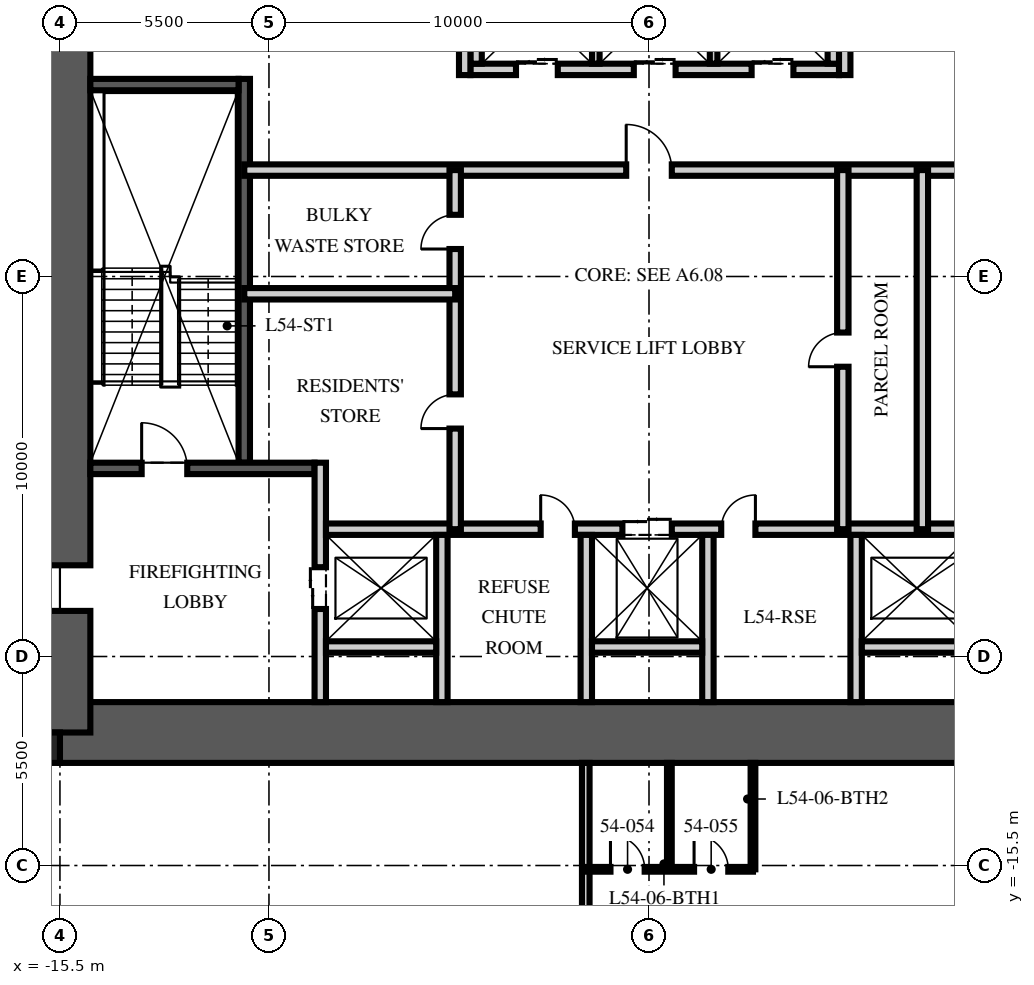
"""IFC4 building model, lengths in metres.
Left out: names, types, materials, properties, quantities, classifications, styles, units other than length and angle.
Written with IfcOpenShell. Run it as: python <this file> out.ifc"""

import sys

from ifc_helpers import new_model, si_unit, direction, frame, frame_2d, origin, origin_2d, place, context, subcontext, project, spatial, rectangle, extrude, element, fill, save


model = new_model("IFC4")
c1 = context("Model", 3, precision=1e-05, world=origin(), true_north=direction((0.0, 1.0)))
c2 = subcontext(c1, "Body", "Model", "MODEL_VIEW")
j1 = project(units=[si_unit("LENGTHUNIT", "METRE"), si_unit("PLANEANGLEUNIT", "RADIAN")], contexts=[c1])
p1 = place(None, origin())
s1 = spatial("IfcSite", under=j1, at=p1, CompositionType="ELEMENT")
p2 = place(p1, origin())
s2 = spatial("IfcBuilding", under=s1, at=p2, CompositionType="ELEMENT")
p3 = place(p2, frame((0.0, 0.0, 218.25)))
s3 = spatial("IfcBuildingStorey", under=s2, at=p3, CompositionType="ELEMENT", Elevation=218.25)
p4 = place(p3, frame((-15.5, -12.0, -0.25), z_axis=(0.0, 0.0, 1.0), x_axis=(1.0, 0.0, 0.0)))
e1 = element("IfcWall", 1, at=p4, inside=s3, PredefinedType="SHEAR", context=c2, shape_type="SweptSolid", body=[
    extrude(rectangle(XDim=31.0, YDim=1.6, at=frame_2d((15.5, 0.0))), origin(), (0.0, 0.0, 1.0), 3.75),
])
p5 = place(p3, frame((-15.5, -12.0, -0.25), z_axis=(0.0, 0.0, 1.0), x_axis=(0.0, 1.0, 0.0)))
e2 = element("IfcWall", 2, at=p5, inside=s3, PredefinedType="SHEAR", context=c2, shape_type="SweptSolid", body=[
    extrude(rectangle(XDim=24.0, YDim=1.6, at=frame_2d((12.0, 0.0))), origin(), (0.0, 0.0, 1.0), 3.75),
])
p6 = place(p5, frame((3.2, 0.0, 0.25)))
e3 = element("IfcOpeningElement", 3, at=p6, cuts=e2, PredefinedType="OPENING", context=c2, shape_type="SweptSolid", body=[
    extrude(rectangle(XDim=1.2, YDim=2.1, at=frame_2d((0.6, 1.05))), frame((0.0, 0.81, 0.0), z_axis=(0.0, -1.0, 0.0), x_axis=(1.0, 0.0, 0.0)), (0.0, 0.0, 1.0), 1.62),
])
p7 = place(p5, frame((19.3, 0.0, 0.25)))
e4 = element("IfcOpeningElement", 4, at=p7, cuts=e2, PredefinedType="OPENING", context=c2, shape_type="SweptSolid", body=[
    extrude(rectangle(XDim=1.8, YDim=2.1, at=frame_2d((0.9, 1.05))), frame((0.0, 0.81, 0.0), z_axis=(0.0, -1.0, 0.0), x_axis=(1.0, 0.0, 0.0)), (0.0, 0.0, 1.0), 1.62),
])
p8 = place(p3, frame((-15.9, -12.4, -0.25), z_axis=(0.0, 0.0, 1.0), x_axis=(1.0, 0.0, 0.0)))
e5 = element("IfcColumn", 5, at=p8, inside=s3, PredefinedType="COLUMN", context=c2, shape_type="SweptSolid", body=[
    extrude(rectangle(XDim=0.8, YDim=0.8, at=origin_2d()), origin(), (0.0, 0.0, 1.0), 3.75),
])
p9 = place(p3, frame((-10.65, -4.9, 0.0), z_axis=(0.0, 0.0, 1.0), x_axis=(0.0, 1.0, 0.0)))
e6 = element("IfcWall", 6, at=p9, inside=s3, PredefinedType="SOLIDWALL", context=c2, shape_type="SweptSolid", body=[
    extrude(rectangle(XDim=10.1, YDim=0.3, at=frame_2d((5.05, 0.0))), origin(), (0.0, 0.0, 1.0), 3.5),
])
p10 = place(p3, frame((-14.7, -5.05, 0.0), z_axis=(0.0, 0.0, 1.0), x_axis=(1.0, 0.0, 0.0)))
e7 = element("IfcWall", 7, at=p10, inside=s3, PredefinedType="SOLIDWALL", context=c2, shape_type="SweptSolid", body=[
    extrude(rectangle(XDim=5.9, YDim=0.3, at=frame_2d((2.95, 0.0))), origin(), (0.0, 0.0, 1.0), 3.5),
])
p11 = place(p10, frame((1.35, 0.0, 0.0)))
e8 = element("IfcOpeningElement", 8, at=p11, cuts=e7, PredefinedType="OPENING", context=c2, shape_type="SweptSolid", body=[
    extrude(rectangle(XDim=1.2, YDim=2.1, at=frame_2d((0.6, 1.05))), frame((0.0, 0.16, 0.0), z_axis=(0.0, -1.0, 0.0), x_axis=(1.0, 0.0, 0.0)), (0.0, 0.0, 1.0), 0.32),
])
p12 = place(p3, frame((-14.7, 5.05, 0.0), z_axis=(0.0, 0.0, 1.0), x_axis=(1.0, 0.0, 0.0)))
e9 = element("IfcWall", 9, at=p12, inside=s3, PredefinedType="SOLIDWALL", context=c2, shape_type="SweptSolid", body=[
    extrude(rectangle(XDim=3.9, YDim=0.3, at=frame_2d((1.95, 0.0))), origin(), (0.0, 0.0, 1.0), 3.5),
])
p13 = place(p3, frame((-8.65, -11.2, 0.0), z_axis=(0.0, 0.0, 1.0), x_axis=(0.0, 1.0, 0.0)))
e10 = element("IfcWall", 10, at=p13, inside=s3, PredefinedType="PARTITIONING", context=c2, shape_type="SweptSolid", body=[
    extrude(rectangle(XDim=6.3, YDim=0.3, at=frame_2d((3.15, 0.0))), origin(), (0.0, 0.0, 1.0), 3.5),
])
p14 = place(p13, frame((2.45, 0.0, 0.0)))
e11 = element("IfcOpeningElement", 11, at=p14, cuts=e10, PredefinedType="OPENING", context=c2, shape_type="SweptSolid", body=[
    extrude(rectangle(XDim=1.1, YDim=2.1, at=frame_2d((0.55, 1.05))), frame((0.0, 0.16, 0.0), z_axis=(0.0, -1.0, 0.0), x_axis=(1.0, 0.0, 0.0)), (0.0, 0.0, 1.0), 0.32),
])
p15 = place(p3, frame((-8.5, -6.65, 0.0), z_axis=(0.0, 0.0, 1.0), x_axis=(1.0, 0.0, 0.0)))
e12 = element("IfcWall", 12, at=p15, inside=s3, PredefinedType="PARTITIONING", context=c2, shape_type="SweptSolid", body=[
    extrude(rectangle(XDim=17.0, YDim=0.3, at=frame_2d((8.5, 0.0))), origin(), (0.0, 0.0, 1.0), 3.5),
])
p16 = place(p15, frame((7.8, 0.0, 0.0)))
e13 = element("IfcOpeningElement", 13, at=p16, cuts=e12, PredefinedType="OPENING", context=c2, shape_type="SweptSolid", body=[
    extrude(rectangle(XDim=1.3, YDim=2.4, at=frame_2d((0.65, 1.2))), frame((0.0, 0.16, 0.0), z_axis=(0.0, -1.0, 0.0), x_axis=(1.0, 0.0, 0.0)), (0.0, 0.0, 1.0), 0.32),
])
p17 = place(p15, frame((5.65, 0.0, 0.0)))
e14 = element("IfcOpeningElement", 14, at=p17, cuts=e12, PredefinedType="OPENING", context=c2, shape_type="SweptSolid", body=[
    extrude(rectangle(XDim=0.9, YDim=2.1, at=frame_2d((0.45, 1.05))), frame((0.0, 0.16, 0.0), z_axis=(0.0, -1.0, 0.0), x_axis=(1.0, 0.0, 0.0)), (0.0, 0.0, 1.0), 0.32),
])
p18 = place(p15, frame((10.4, 0.0, 0.0)))
e15 = element("IfcOpeningElement", 15, at=p18, cuts=e12, PredefinedType="OPENING", context=c2, shape_type="SweptSolid", body=[
    extrude(rectangle(XDim=0.9, YDim=2.1, at=frame_2d((0.45, 1.05))), frame((0.0, 0.16, 0.0), z_axis=(0.0, -1.0, 0.0), x_axis=(1.0, 0.0, 0.0)), (0.0, 0.0, 1.0), 0.32),
])
for number, where, z_axis, x_axis in (
    (16, (-5.45, -11.2, 0.0), (0.0, 0.0, 1.0), (0.0, 1.0, 0.0)),
    (17, (-1.65, -11.2, 0.0), (0.0, 0.0, 1.0), (0.0, 1.0, 0.0)),
    (18, (1.55, -11.2, 0.0), (0.0, 0.0, 1.0), (0.0, 1.0, 0.0)),
    (19, (5.45, -11.2, 0.0), (0.0, 0.0, 1.0), (0.0, 1.0, 0.0)),
):
    element("IfcWall", number, at=place(p3, frame(where, z_axis=z_axis, x_axis=x_axis)), inside=s3, PredefinedType="PARTITIONING", context=c2, shape_type="SweptSolid", body=[
        extrude(rectangle(XDim=4.4, YDim=0.3, at=frame_2d((2.2, 0.0))), origin(), (0.0, 0.0, 1.0), 3.5),
    ])
for number, where, z_axis, x_axis in (
    (20, (-8.5, -9.75, 0.0), (0.0, 0.0, 1.0), (1.0, 0.0, 0.0)),
    (21, (-1.5, -9.75, 0.0), (0.0, 0.0, 1.0), (1.0, 0.0, 0.0)),
    (22, (5.6, -9.75, 0.0), (0.0, 0.0, 1.0), (1.0, 0.0, 0.0)),
):
    element("IfcWall", number, at=place(p3, frame(where, z_axis=z_axis, x_axis=x_axis)), inside=s3, PredefinedType="PARTITIONING", context=c2, shape_type="SweptSolid", body=[
        extrude(rectangle(XDim=2.9, YDim=0.3, at=frame_2d((1.45, 0.0))), origin(), (0.0, 0.0, 1.0), 3.5),
    ])
p19 = place(p3, frame((-4.7, 5.45, 0.0), z_axis=(0.0, 0.0, 1.0), x_axis=(1.0, 0.0, 0.0)))
e23 = element("IfcWall", 23, at=p19, inside=s3, PredefinedType="PARTITIONING", context=c2, shape_type="SweptSolid", body=[
    extrude(rectangle(XDim=9.7, YDim=0.3, at=frame_2d((4.85, 0.0))), origin(), (0.0, 0.0, 1.0), 3.5),
])
p20 = place(p19, frame((1.2, 0.0, 0.0)))
e24 = element("IfcOpeningElement", 24, at=p20, cuts=e23, PredefinedType="OPENING", context=c2, shape_type="SweptSolid", body=[
    extrude(rectangle(XDim=1.1, YDim=2.1, at=frame_2d((0.55, 1.05))), frame((0.0, 0.16, 0.0), z_axis=(0.0, -1.0, 0.0), x_axis=(1.0, 0.0, 0.0)), (0.0, 0.0, 1.0), 0.32),
])
p21 = place(p19, frame((4.3, 0.0, 0.0)))
e25 = element("IfcOpeningElement", 25, at=p21, cuts=e23, PredefinedType="OPENING", context=c2, shape_type="SweptSolid", body=[
    extrude(rectangle(XDim=1.1, YDim=2.1, at=frame_2d((0.55, 1.05))), frame((0.0, 0.16, 0.0), z_axis=(0.0, -1.0, 0.0), x_axis=(1.0, 0.0, 0.0)), (0.0, 0.0, 1.0), 0.32),
])
p22 = place(p19, frame((7.4, 0.0, 0.0)))
e26 = element("IfcOpeningElement", 26, at=p22, cuts=e23, PredefinedType="OPENING", context=c2, shape_type="SweptSolid", body=[
    extrude(rectangle(XDim=1.1, YDim=2.1, at=frame_2d((0.55, 1.05))), frame((0.0, 0.16, 0.0), z_axis=(0.0, -1.0, 0.0), x_axis=(1.0, 0.0, 0.0)), (0.0, 0.0, 1.0), 0.32),
])
for number, where, z_axis, x_axis in (
    (27, (-4.55, 5.6, 0.0), (0.0, 0.0, 1.0), (0.0, 1.0, 0.0)),
    (28, (4.85, 5.6, 0.0), (0.0, 0.0, 1.0), (0.0, 1.0, 0.0)),
):
    element("IfcWall", number, at=place(p3, frame(where, z_axis=z_axis, x_axis=x_axis)), inside=s3, PredefinedType="PARTITIONING", context=c2, shape_type="SweptSolid", body=[
        extrude(rectangle(XDim=2.8, YDim=0.3, at=frame_2d((1.4, 0.0))), origin(), (0.0, 0.0, 1.0), 3.5),
    ])
for number, where, z_axis, x_axis in (
    (29, (-1.4, 5.6, 0.0), (0.0, 0.0, 1.0), (0.0, 1.0, 0.0)),
    (30, (1.7, 5.6, 0.0), (0.0, 0.0, 1.0), (0.0, 1.0, 0.0)),
):
    element("IfcWall", number, at=place(p3, frame(where, z_axis=z_axis, x_axis=x_axis)), inside=s3, PredefinedType="PARTITIONING", context=c2, shape_type="SweptSolid", body=[
        extrude(rectangle(XDim=2.8, YDim=0.2, at=frame_2d((1.4, 0.0))), origin(), (0.0, 0.0, 1.0), 3.5),
    ])
p23 = place(p3, frame((-10.65, 2.8, 0.0), z_axis=(0.0, 0.0, 1.0), x_axis=(1.0, 0.0, 0.0)))
e31 = element("IfcWall", 31, at=p23, inside=s3, PredefinedType="PARTITIONING", context=c2, shape_type="SweptSolid", body=[
    extrude(rectangle(XDim=21.3, YDim=0.3, at=frame_2d((10.65, 0.0))), origin(), (0.0, 0.0, 1.0), 3.5),
])
p24 = place(p23, frame((10.05, 0.0, 0.0)))
e32 = element("IfcOpeningElement", 32, at=p24, cuts=e31, PredefinedType="OPENING", context=c2, shape_type="SweptSolid", body=[
    extrude(rectangle(XDim=1.2, YDim=2.1, at=frame_2d((0.6, 1.05))), frame((0.0, 0.16, 0.0), z_axis=(0.0, -1.0, 0.0), x_axis=(1.0, 0.0, 0.0)), (0.0, 0.0, 1.0), 0.32),
])
p25 = place(p23, frame((19.121, 0.0, 0.0)))
e33 = element("IfcOpeningElement", 33, at=p25, cuts=e31, PredefinedType="OPENING", context=c2, shape_type="SweptSolid", body=[
    extrude(rectangle(XDim=0.9, YDim=2.1, at=frame_2d((0.45, 1.05))), frame((0.0, 0.16, 0.0), z_axis=(0.0, -1.0, 0.0), x_axis=(1.0, 0.0, 0.0)), (0.0, 0.0, 1.0), 0.32),
])
p26 = place(p3, frame((-5.1, -6.65, 0.0), z_axis=(0.0, 0.0, 1.0), x_axis=(0.0, 1.0, 0.0)))
e34 = element("IfcWall", 34, at=p26, inside=s3, PredefinedType="PARTITIONING", context=c2, shape_type="SweptSolid", body=[
    extrude(rectangle(XDim=9.45, YDim=0.3, at=frame_2d((4.725, 0.0))), origin(), (0.0, 0.0, 1.0), 3.5),
])
p27 = place(p26, frame((2.648, 0.0, 0.0)))
e35 = element("IfcOpeningElement", 35, at=p27, cuts=e34, PredefinedType="OPENING", context=c2, shape_type="SweptSolid", body=[
    extrude(rectangle(XDim=0.9, YDim=2.1, at=frame_2d((0.45, 1.05))), frame((0.0, 0.16, 0.0), z_axis=(0.0, -1.0, 0.0), x_axis=(1.0, 0.0, 0.0)), (0.0, 0.0, 1.0), 0.32),
])
p28 = place(p26, frame((7.373, 0.0, 0.0)))
e36 = element("IfcOpeningElement", 36, at=p28, cuts=e34, PredefinedType="OPENING", context=c2, shape_type="SweptSolid", body=[
    extrude(rectangle(XDim=0.9, YDim=2.1, at=frame_2d((0.45, 1.05))), frame((0.0, 0.16, 0.0), z_axis=(0.0, -1.0, 0.0), x_axis=(1.0, 0.0, 0.0)), (0.0, 0.0, 1.0), 0.32),
])
p29 = place(p3, frame((5.1, -6.65, 0.0), z_axis=(0.0, 0.0, 1.0), x_axis=(0.0, 1.0, 0.0)))
e37 = element("IfcWall", 37, at=p29, inside=s3, PredefinedType="PARTITIONING", context=c2, shape_type="SweptSolid", body=[
    extrude(rectangle(XDim=9.45, YDim=0.3, at=frame_2d((4.725, 0.0))), origin(), (0.0, 0.0, 1.0), 3.5),
])
p30 = place(p29, frame((4.275, 0.0, 0.0)))
e38 = element("IfcOpeningElement", 38, at=p30, cuts=e37, PredefinedType="OPENING", context=c2, shape_type="SweptSolid", body=[
    extrude(rectangle(XDim=0.9, YDim=2.1, at=frame_2d((0.45, 1.05))), frame((0.0, 0.16, 0.0), z_axis=(0.0, -1.0, 0.0), x_axis=(1.0, 0.0, 0.0)), (0.0, 0.0, 1.0), 0.32),
])
p31 = place(p3, frame((-10.65, -0.455, 0.0), z_axis=(0.0, 0.0, 1.0), x_axis=(1.0, 0.0, 0.0)))
e39 = element("IfcWall", 39, at=p31, inside=s3, PredefinedType="PARTITIONING", context=c2, shape_type="SweptSolid", body=[
    extrude(rectangle(XDim=5.55, YDim=0.3, at=frame_2d((2.775, 0.0))), origin(), (0.0, 0.0, 1.0), 3.5),
])
p32 = place(p3, frame((7.193, -6.65, 0.0), z_axis=(0.0, 0.0, 1.0), x_axis=(0.0, 1.0, 0.0)))
e40 = element("IfcWall", 40, at=p32, inside=s3, PredefinedType="PARTITIONING", context=c2, shape_type="SweptSolid", body=[
    extrude(rectangle(XDim=9.45, YDim=0.3, at=frame_2d((4.725, 0.0))), origin(), (0.0, 0.0, 1.0), 3.5),
])
p33 = place(p3, frame((-4.85, 5.3, 0.0), z_axis=(0.0, 0.0, 1.0), x_axis=(0.0, 1.0, 0.0)))
e41 = element("IfcWall", 41, at=p33, inside=s3, PredefinedType="PARTITIONING", context=c2, shape_type="SweptSolid", body=[
    extrude(rectangle(XDim=5.9, YDim=0.3, at=frame_2d((2.95, 0.0))), origin(), (0.0, 0.0, 1.0), 3.5),
])
p34 = place(p33, frame((4.15, 0.0, 0.0)))
e42 = element("IfcOpeningElement", 42, at=p34, cuts=e41, PredefinedType="OPENING", context=c2, shape_type="SweptSolid", body=[
    extrude(rectangle(XDim=0.9, YDim=2.1, at=frame_2d((0.45, 1.05))), frame((0.0, 0.16, 0.0), z_axis=(0.0, -1.0, 0.0), x_axis=(1.0, 0.0, 0.0)), (0.0, 0.0, 1.0), 0.32),
])
p35 = place(p3, frame((5.15, 5.3, 0.0), z_axis=(0.0, 0.0, 1.0), x_axis=(0.0, 1.0, 0.0)))
e43 = element("IfcWall", 43, at=p35, inside=s3, PredefinedType="PARTITIONING", context=c2, shape_type="SweptSolid", body=[
    extrude(rectangle(XDim=5.9, YDim=0.3, at=frame_2d((2.95, 0.0))), origin(), (0.0, 0.0, 1.0), 3.5),
])
p36 = place(p35, frame((4.15, 0.0, 0.0)))
e44 = element("IfcOpeningElement", 44, at=p36, cuts=e43, PredefinedType="OPENING", context=c2, shape_type="SweptSolid", body=[
    extrude(rectangle(XDim=0.9, YDim=2.1, at=frame_2d((0.45, 1.05))), frame((0.0, 0.16, 0.0), z_axis=(0.0, -1.0, 0.0), x_axis=(1.0, 0.0, 0.0)), (0.0, 0.0, 1.0), 0.32),
])
p37 = place(p3, frame((-1.664, -12.8, 0.0), z_axis=(0.0, 0.0, 1.0), x_axis=(0.0, -1.0, 0.0)))
e45 = element("IfcWall", 45, at=p37, inside=s3, PredefinedType="PARTITIONING", context=c2, shape_type="SweptSolid", body=[
    extrude(rectangle(XDim=13.4, YDim=0.2, at=frame_2d((6.7, 0.0))), origin(), (0.0, 0.0, 1.0), 2.91),
])
p38 = place(p3, frame((-1.664, -15.6, 0.0), z_axis=(0.0, 0.0, 1.0), x_axis=(1.0, 0.0, 0.0)))
e46 = element("IfcWall", 46, at=p38, inside=s3, PredefinedType="PARTITIONING", context=c2, shape_type="SweptSolid", body=[
    extrude(rectangle(XDim=4.4, YDim=0.125, at=frame_2d((2.2, 0.0))), origin(), (0.0, 0.0, 1.0), 2.6),
])
p39 = place(p38, frame((0.65, 0.0, 0.0)))
e47 = element("IfcOpeningElement", 47, at=p39, cuts=e46, PredefinedType="OPENING", context=c2, shape_type="SweptSolid", body=[
    extrude(rectangle(XDim=0.9, YDim=2.1, at=frame_2d((0.45, 1.05))), frame((0.0, 0.073, 0.0), z_axis=(0.0, -1.0, 0.0), x_axis=(1.0, 0.0, 0.0)), (0.0, 0.0, 1.0), 0.145),
])
p40 = place(p38, frame((2.85, 0.0, 0.0)))
e48 = element("IfcOpeningElement", 48, at=p40, cuts=e46, PredefinedType="OPENING", context=c2, shape_type="SweptSolid", body=[
    extrude(rectangle(XDim=0.9, YDim=2.1, at=frame_2d((0.45, 1.05))), frame((0.0, 0.073, 0.0), z_axis=(0.0, -1.0, 0.0), x_axis=(1.0, 0.0, 0.0)), (0.0, 0.0, 1.0), 0.145),
])
for number, where, z_axis, x_axis in (
    (49, (0.536, -12.8, 0.0), (0.0, 0.0, 1.0), (0.0, -1.0, 0.0)),
    (50, (2.736, -12.8, 0.0), (0.0, 0.0, 1.0), (0.0, -1.0, 0.0)),
):
    element("IfcWall", number, at=place(p3, frame(where, z_axis=z_axis, x_axis=x_axis)), inside=s3, PredefinedType="PARTITIONING", context=c2, shape_type="SweptSolid", body=[
        extrude(rectangle(XDim=2.8, YDim=0.125, at=frame_2d((1.4, 0.0))), origin(), (0.0, 0.0, 1.0), 3.5),
    ])
p41 = place(p11, origin())
e51 = element("IfcDoor", 51, at=p41, inside=s3, OperationType="SINGLE_SWING_LEFT", PredefinedType="DOOR", context=c2, shape_type="SweptSolid", body=[
    extrude(rectangle(XDim=1.2, YDim=2.1, at=frame_2d((0.6, 1.05))), frame((0.0, 0.025, 0.0), z_axis=(0.0, -1.0, 0.0), x_axis=(1.0, 0.0, 0.0)), (0.0, 0.0, 1.0), 0.05),
])
fill(e8, e51)
p42 = place(p6, origin())
e52 = element("IfcDoor", 52, at=p42, inside=s3, OperationType="SINGLE_SWING_LEFT", PredefinedType="DOOR", context=c2, shape_type="SweptSolid", body=[
    extrude(rectangle(XDim=1.2, YDim=2.1, at=frame_2d((0.6, 1.05))), frame((0.0, 0.025, 0.0), z_axis=(0.0, -1.0, 0.0), x_axis=(1.0, 0.0, 0.0)), (0.0, 0.0, 1.0), 0.05),
])
fill(e3, e52)
p43 = place(p14, origin())
e53 = element("IfcDoor", 53, at=p43, inside=s3, OperationType="DOUBLE_DOOR_SLIDING", PredefinedType="DOOR", context=c2, shape_type="SweptSolid", body=[
    extrude(rectangle(XDim=1.1, YDim=2.1, at=frame_2d((0.55, 1.05))), frame((0.0, 0.025, 0.0), z_axis=(0.0, -1.0, 0.0), x_axis=(1.0, 0.0, 0.0)), (0.0, 0.0, 1.0), 0.05),
])
fill(e11, e53)
p44 = place(p20, origin())
e54 = element("IfcDoor", 54, at=p44, inside=s3, OperationType="DOUBLE_DOOR_SLIDING", PredefinedType="DOOR", context=c2, shape_type="SweptSolid", body=[
    extrude(rectangle(XDim=1.1, YDim=2.1, at=frame_2d((0.55, 1.05))), frame((0.0, 0.025, 0.0), z_axis=(0.0, -1.0, 0.0), x_axis=(1.0, 0.0, 0.0)), (0.0, 0.0, 1.0), 0.05),
])
fill(e24, e54)
p45 = place(p21, origin())
e55 = element("IfcDoor", 55, at=p45, inside=s3, OperationType="DOUBLE_DOOR_SLIDING", PredefinedType="DOOR", context=c2, shape_type="SweptSolid", body=[
    extrude(rectangle(XDim=1.1, YDim=2.1, at=frame_2d((0.55, 1.05))), frame((0.0, 0.025, 0.0), z_axis=(0.0, -1.0, 0.0), x_axis=(1.0, 0.0, 0.0)), (0.0, 0.0, 1.0), 0.05),
])
fill(e25, e55)
p46 = place(p22, origin())
e56 = element("IfcDoor", 56, at=p46, inside=s3, OperationType="DOUBLE_DOOR_SLIDING", PredefinedType="DOOR", context=c2, shape_type="SweptSolid", body=[
    extrude(rectangle(XDim=1.1, YDim=2.1, at=frame_2d((0.55, 1.05))), frame((0.0, 0.025, 0.0), z_axis=(0.0, -1.0, 0.0), x_axis=(1.0, 0.0, 0.0)), (0.0, 0.0, 1.0), 0.05),
])
fill(e26, e56)
p47 = place(p16, origin())
e57 = element("IfcDoor", 57, at=p47, inside=s3, OperationType="DOUBLE_DOOR_SLIDING", PredefinedType="DOOR", context=c2, shape_type="SweptSolid", body=[
    extrude(rectangle(XDim=1.3, YDim=2.4, at=frame_2d((0.65, 1.2))), frame((0.0, 0.025, 0.0), z_axis=(0.0, -1.0, 0.0), x_axis=(1.0, 0.0, 0.0)), (0.0, 0.0, 1.0), 0.05),
])
fill(e13, e57)
p48 = place(p24, origin())
e58 = element("IfcDoor", 58, at=p48, inside=s3, OperationType="SINGLE_SWING_LEFT", PredefinedType="DOOR", context=c2, shape_type="SweptSolid", body=[
    extrude(rectangle(XDim=1.2, YDim=2.1, at=frame_2d((0.6, 1.05))), frame((0.0, 0.025, 0.0), z_axis=(0.0, -1.0, 0.0), x_axis=(1.0, 0.0, 0.0)), (0.0, 0.0, 1.0), 0.05),
])
fill(e32, e58)
p49 = place(p17, origin())
e59 = element("IfcDoor", 59, at=p49, inside=s3, OperationType="SINGLE_SWING_LEFT", PredefinedType="DOOR", context=c2, shape_type="SweptSolid", body=[
    extrude(rectangle(XDim=0.9, YDim=2.1, at=frame_2d((0.45, 1.05))), frame((0.0, 0.025, 0.0), z_axis=(0.0, -1.0, 0.0), x_axis=(1.0, 0.0, 0.0)), (0.0, 0.0, 1.0), 0.05),
])
fill(e14, e59)
p50 = place(p18, origin())
e60 = element("IfcDoor", 60, at=p50, inside=s3, OperationType="SINGLE_SWING_RIGHT", PredefinedType="DOOR", context=c2, shape_type="SweptSolid", body=[
    extrude(rectangle(XDim=0.9, YDim=2.1, at=frame_2d((0.45, 1.05))), frame((0.0, 0.025, 0.0), z_axis=(0.0, -1.0, 0.0), x_axis=(1.0, 0.0, 0.0)), (0.0, 0.0, 1.0), 0.05),
])
fill(e15, e60)
p51 = place(p27, origin())
e61 = element("IfcDoor", 61, at=p51, inside=s3, OperationType="SINGLE_SWING_LEFT", PredefinedType="DOOR", context=c2, shape_type="SweptSolid", body=[
    extrude(rectangle(XDim=0.9, YDim=2.1, at=frame_2d((0.45, 1.05))), frame((0.0, 0.025, 0.0), z_axis=(0.0, -1.0, 0.0), x_axis=(1.0, 0.0, 0.0)), (0.0, 0.0, 1.0), 0.05),
])
fill(e35, e61)
p52 = place(p28, origin())
e62 = element("IfcDoor", 62, at=p52, inside=s3, OperationType="SINGLE_SWING_LEFT", PredefinedType="DOOR", context=c2, shape_type="SweptSolid", body=[
    extrude(rectangle(XDim=0.9, YDim=2.1, at=frame_2d((0.45, 1.05))), frame((0.0, 0.025, 0.0), z_axis=(0.0, -1.0, 0.0), x_axis=(1.0, 0.0, 0.0)), (0.0, 0.0, 1.0), 0.05),
])
fill(e36, e62)
p53 = place(p30, origin())
e63 = element("IfcDoor", 63, at=p53, inside=s3, OperationType="SINGLE_SWING_LEFT", PredefinedType="DOOR", context=c2, shape_type="SweptSolid", body=[
    extrude(rectangle(XDim=0.9, YDim=2.1, at=frame_2d((0.45, 1.05))), frame((0.0, 0.025, 0.0), z_axis=(0.0, -1.0, 0.0), x_axis=(1.0, 0.0, 0.0)), (0.0, 0.0, 1.0), 0.05),
])
fill(e38, e63)
p54 = place(p39, origin())
e64 = element("IfcDoor", 64, at=p54, inside=s3, OperationType="SINGLE_SWING_LEFT", PredefinedType="DOOR", context=c2, shape_type="SweptSolid", body=[
    extrude(rectangle(XDim=0.9, YDim=2.1, at=frame_2d((0.45, 1.05))), frame((0.0, 0.025, 0.0), z_axis=(0.0, -1.0, 0.0), x_axis=(1.0, 0.0, 0.0)), (0.0, 0.0, 1.0), 0.05),
])
fill(e47, e64)
p55 = place(p40, origin())
e65 = element("IfcDoor", 65, at=p55, inside=s3, OperationType="SINGLE_SWING_LEFT", PredefinedType="DOOR", context=c2, shape_type="SweptSolid", body=[
    extrude(rectangle(XDim=0.9, YDim=2.1, at=frame_2d((0.45, 1.05))), frame((0.0, 0.025, 0.0), z_axis=(0.0, -1.0, 0.0), x_axis=(1.0, 0.0, 0.0)), (0.0, 0.0, 1.0), 0.05),
])
fill(e48, e65)
save(model, sys.argv[1])
